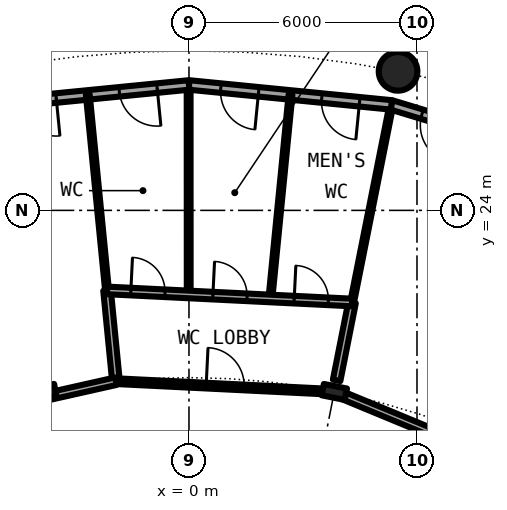
"""IFC4 building model, lengths in metres.
Left out: names, types, materials, properties, quantities, classifications, styles, units other than length and angle.
Written with IfcOpenShell. Run it as: python <this file> out.ifc"""

import sys

from ifc_helpers import new_model, si_unit, direction, frame, frame_2d, origin, origin_2d, place, context, subcontext, project, spatial, rectangle, hollow_circle, i_section, extrude, element, fill, save


model = new_model("IFC4")
c1 = context("Model", 3, precision=1e-05, world=origin(), true_north=direction((0.0, 1.0)))
c2 = subcontext(c1, "Body", "Model", "MODEL_VIEW")
j1 = project(units=[si_unit("LENGTHUNIT", "METRE"), si_unit("PLANEANGLEUNIT", "RADIAN")], contexts=[c1])
p1 = place(None, origin())
s1 = spatial("IfcSite", under=j1, at=p1, CompositionType="ELEMENT")
p2 = place(p1, origin())
s2 = spatial("IfcBuilding", under=s1, at=p2, CompositionType="ELEMENT")
p3 = place(p2, frame((0.0, 0.0, 53.3)))
s3 = spatial("IfcBuildingStorey", under=s2, at=p3, CompositionType="ELEMENT", Elevation=53.3)
p4 = place(p3, frame((5.501, 27.658, 0.0), z_axis=(0.0, 0.0, 1.0), x_axis=(1.0, 0.0, 0.0)))
e1 = element("IfcColumn", 1, at=p4, inside=s3, PredefinedType="COLUMN", context=c2, shape_type="SweptSolid", body=[
    extrude(hollow_circle(Radius=0.508, WallThickness=0.05, at=origin_2d()), origin(), (0.0, 0.0, 1.0), 4.2),
])
for number, where, z_axis, x_axis in (
    (2, (3.824, 19.223, 0.0), (0.0, 0.0, 1.0), (0.195, 0.981, 0.0)),
    (3, (-3.824, 19.223, 0.0), (0.0, 0.0, 1.0), (-0.195, 0.981, 0.0)),
):
    element("IfcColumn", number, at=place(p3, frame(where, z_axis=z_axis, x_axis=x_axis)), inside=s3, PredefinedType="COLUMN", context=c2, shape_type="SweptSolid", body=[
        extrude(i_section(OverallWidth=0.305, OverallDepth=0.62, WebThickness=0.021, FlangeThickness=0.04, FilletRadius=0.027, at=origin_2d()), origin(), (0.0, 0.0, 1.0), 4.2),
    ])
p5 = place(p3, frame((10.447, 25.222, 0.0), z_axis=(0.0, 0.0, 1.0), x_axis=(-0.956965678721, 0.290201119486, 0.0)))
e4 = element("IfcWall", 4, at=p5, inside=s3, PredefinedType="SOLIDWALL", context=c2, shape_type="SweptSolid", body=[
    extrude(rectangle(XDim=5.351, YDim=0.25, at=frame_2d((2.676, 0.0))), origin(), (0.0, 0.0, 1.0), 3.8),
])
p6 = place(p5, frame((0.841, 0.0, 0.0)))
e5 = element("IfcOpeningElement", 5, at=p6, cuts=e4, PredefinedType="OPENING", context=c2, shape_type="SweptSolid", body=[
    extrude(rectangle(XDim=1.0, YDim=2.2, at=frame_2d((0.5, 1.1))), frame((0.0, 0.135, 0.0), z_axis=(0.0, -1.0, 0.0), x_axis=(1.0, 0.0, 0.0)), (0.0, 0.0, 1.0), 0.27),
])
p7 = place(p5, frame((3.51, 0.0, 0.0)))
e6 = element("IfcOpeningElement", 6, at=p7, cuts=e4, PredefinedType="OPENING", context=c2, shape_type="SweptSolid", body=[
    extrude(rectangle(XDim=1.0, YDim=2.2, at=frame_2d((0.5, 1.1))), frame((0.0, 0.135, 0.0), z_axis=(0.0, -1.0, 0.0), x_axis=(1.0, 0.0, 0.0)), (0.0, 0.0, 1.0), 0.27),
])
p8 = place(p3, frame((5.326, 26.775, 0.0), z_axis=(0.0, 0.0, 1.0), x_axis=(-0.995173996315, 0.098126026407, 0.0)))
e7 = element("IfcWall", 7, at=p8, inside=s3, PredefinedType="SOLIDWALL", context=c2, shape_type="SweptSolid", body=[
    extrude(rectangle(XDim=5.352, YDim=0.25, at=frame_2d((2.676, 0.0))), origin(), (0.0, 0.0, 1.0), 3.8),
])
p9 = place(p8, frame((0.841, 0.0, 0.0)))
e8 = element("IfcOpeningElement", 8, at=p9, cuts=e7, PredefinedType="OPENING", context=c2, shape_type="SweptSolid", body=[
    extrude(rectangle(XDim=1.0, YDim=2.2, at=frame_2d((0.5, 1.1))), frame((0.0, 0.135, 0.0), z_axis=(0.0, -1.0, 0.0), x_axis=(1.0, 0.0, 0.0)), (0.0, 0.0, 1.0), 0.27),
])
p10 = place(p8, frame((3.51, 0.0, 0.0)))
e9 = element("IfcOpeningElement", 9, at=p10, cuts=e7, PredefinedType="OPENING", context=c2, shape_type="SweptSolid", body=[
    extrude(rectangle(XDim=1.0, YDim=2.2, at=frame_2d((0.5, 1.1))), frame((0.0, 0.135, 0.0), z_axis=(0.0, -1.0, 0.0), x_axis=(1.0, 0.0, 0.0)), (0.0, 0.0, 1.0), 0.27),
])
p11 = place(p3, frame((0.0, 27.3, 0.0), z_axis=(0.0, 0.0, 1.0), x_axis=(-0.995173996315, -0.098126026407, 0.0)))
e10 = element("IfcWall", 10, at=p11, inside=s3, PredefinedType="SOLIDWALL", context=c2, shape_type="SweptSolid", body=[
    extrude(rectangle(XDim=5.352, YDim=0.25, at=frame_2d((2.676, 0.0))), origin(), (0.0, 0.0, 1.0), 3.8),
])
p12 = place(p11, frame((0.841, 0.0, 0.0)))
e11 = element("IfcOpeningElement", 11, at=p12, cuts=e10, PredefinedType="OPENING", context=c2, shape_type="SweptSolid", body=[
    extrude(rectangle(XDim=1.0, YDim=2.2, at=frame_2d((0.5, 1.1))), frame((0.0, 0.135, 0.0), z_axis=(0.0, -1.0, 0.0), x_axis=(1.0, 0.0, 0.0)), (0.0, 0.0, 1.0), 0.27),
])
p13 = place(p11, frame((3.51, 0.0, 0.0)))
e12 = element("IfcOpeningElement", 12, at=p13, cuts=e10, PredefinedType="OPENING", context=c2, shape_type="SweptSolid", body=[
    extrude(rectangle(XDim=1.0, YDim=2.2, at=frame_2d((0.5, 1.1))), frame((0.0, 0.135, 0.0), z_axis=(0.0, -1.0, 0.0), x_axis=(1.0, 0.0, 0.0)), (0.0, 0.0, 1.0), 0.27),
])
p14 = place(p3, frame((-2.663, 27.044, 0.0), z_axis=(0.0, 0.0, 1.0), x_axis=(0.097990148768, -0.995187384739, 0.0)))
e13 = element("IfcWall", 13, at=p14, inside=s3, PredefinedType="PARTITIONING", context=c2, shape_type="SweptSolid", body=[
    extrude(rectangle(XDim=5.175, YDim=0.1, at=frame_2d((2.587, 0.0))), origin(), (0.0, 0.0, 1.0), 3.8),
])
p15 = place(p3, frame((-2.156, 21.894, 0.0), z_axis=(0.0, 0.0, 1.0), x_axis=(0.097982433599, -0.995188144376, 0.0)))
e14 = element("IfcWall", 14, at=p15, inside=s3, PredefinedType="PARTITIONING", context=c2, shape_type="SweptSolid", body=[
    extrude(rectangle(XDim=2.399, YDim=0.2, at=frame_2d((1.2, 0.0))), origin(), (0.0, 0.0, 1.0), 3.8),
])
p16 = place(p3, frame((-0.007, 21.788, 0.0), z_axis=(0.0, 0.0, 1.0), x_axis=(-0.000362565125, 0.999999934273, 0.0)))
e15 = element("IfcWall", 15, at=p16, inside=s3, PredefinedType="PARTITIONING", context=c2, shape_type="SweptSolid", body=[
    extrude(rectangle(XDim=5.387, YDim=0.1, at=frame_2d((2.693, 0.0))), origin(), (0.0, 0.0, 1.0), 3.8),
])
p17 = place(p3, frame((2.143, 21.683, 0.0), z_axis=(0.0, 0.0, 1.0), x_axis=(0.098229025711, 0.995163835008, 0.0)))
e16 = element("IfcWall", 16, at=p17, inside=s3, PredefinedType="PARTITIONING", context=c2, shape_type="SweptSolid", body=[
    extrude(rectangle(XDim=5.386, YDim=0.1, at=frame_2d((2.693, 0.0))), origin(), (0.0, 0.0, 1.0), 3.8),
])
p18 = place(p3, frame((3.885, 19.527, 0.0), z_axis=(0.0, 0.0, 1.0), x_axis=(0.194745508922, 0.980853804986, 0.0)))
e17 = element("IfcWall", 17, at=p18, inside=s3, PredefinedType="PARTITIONING", context=c2, shape_type="SweptSolid", body=[
    extrude(rectangle(XDim=2.09, YDim=0.2, at=frame_2d((1.045, 0.0))), origin(), (0.0, 0.0, 1.0), 3.8),
])
p19 = place(p3, frame((4.292, 21.577, 0.0), z_axis=(0.0, 0.0, 1.0), x_axis=(0.19514541008, 0.980774321098, 0.0)))
e18 = element("IfcWall", 18, at=p19, inside=s3, PredefinedType="PARTITIONING", context=c2, shape_type="SweptSolid", body=[
    extrude(rectangle(XDim=5.176, YDim=0.1, at=frame_2d((2.588, 0.0))), origin(), (0.0, 0.0, 1.0), 3.8),
])
p20 = place(p3, frame((3.967, 19.164, 0.0), z_axis=(0.0, 0.0, 1.0), x_axis=(0.923873274019, -0.382698541353, 0.0)))
e19 = element("IfcWall", 19, at=p20, inside=s3, PredefinedType="PARTITIONING", context=c2, shape_type="SweptSolid", body=[
    extrude(rectangle(XDim=7.338, YDim=0.2, at=frame_2d((3.669, 0.0))), origin(), (0.0, 0.0, 1.0), 3.48),
])
p21 = place(p3, frame((-1.921, 19.506, 0.0), z_axis=(0.0, 0.0, 1.0), x_axis=(0.99879118777, -0.049154483346, 0.0)))
e20 = element("IfcWall", 20, at=p21, inside=s3, PredefinedType="PARTITIONING", context=c2, shape_type="SweptSolid", body=[
    extrude(rectangle(XDim=5.598, YDim=0.15, at=frame_2d((2.799, 0.0))), origin(), (0.0, 0.0, 1.0), 3.48),
])
p22 = place(p21, frame((2.376, 0.0, 0.0)))
e21 = element("IfcOpeningElement", 21, at=p22, cuts=e20, PredefinedType="OPENING", context=c2, shape_type="SweptSolid", body=[
    extrude(rectangle(XDim=1.0, YDim=2.3, at=frame_2d((0.5, 1.15))), frame((0.0, 0.085, 0.0), z_axis=(0.0, -1.0, 0.0), x_axis=(1.0, 0.0, 0.0)), (0.0, 0.0, 1.0), 0.17),
])
p23 = place(p3, frame((-3.647, 19.118, 0.0), z_axis=(0.0, 0.0, 1.0), x_axis=(0.975631915864, 0.219413684049, 0.0)))
e22 = element("IfcWall", 22, at=p23, inside=s3, PredefinedType="PARTITIONING", context=c2, shape_type="SweptSolid", body=[
    extrude(rectangle(XDim=1.769, YDim=0.2, at=frame_2d((0.885, 0.0))), origin(), (0.0, 0.0, 1.0), 3.48),
])
p24 = place(p3, frame((-2.156, 21.894, 0.0), z_axis=(0.0, 0.0, 1.0), x_axis=(0.998785221138, -0.049275572418, 0.0)))
e23 = element("IfcWall", 23, at=p24, inside=s3, PredefinedType="PARTITIONING", context=c2, shape_type="SweptSolid", body=[
    extrude(rectangle(XDim=6.456, YDim=0.2, at=frame_2d((3.228, 0.0))), origin(), (0.0, 0.0, 1.0), 3.8),
])
p25 = place(p24, frame((4.93, 0.0, 0.0)))
e24 = element("IfcOpeningElement", 24, at=p25, cuts=e23, PredefinedType="OPENING", context=c2, shape_type="SweptSolid", body=[
    extrude(rectangle(XDim=0.9, YDim=2.3, at=frame_2d((0.45, 1.15))), frame((0.0, 0.11, 0.0), z_axis=(0.0, -1.0, 0.0), x_axis=(1.0, 0.0, 0.0)), (0.0, 0.0, 1.0), 0.22),
])
p26 = place(p24, frame((2.788, 0.0, 0.0)))
e25 = element("IfcOpeningElement", 25, at=p26, cuts=e23, PredefinedType="OPENING", context=c2, shape_type="SweptSolid", body=[
    extrude(rectangle(XDim=0.9, YDim=2.3, at=frame_2d((0.45, 1.15))), frame((0.0, 0.11, 0.0), z_axis=(0.0, -1.0, 0.0), x_axis=(1.0, 0.0, 0.0)), (0.0, 0.0, 1.0), 0.22),
])
p27 = place(p24, frame((0.626, 0.0, 0.0)))
e26 = element("IfcOpeningElement", 26, at=p27, cuts=e23, PredefinedType="OPENING", context=c2, shape_type="SweptSolid", body=[
    extrude(rectangle(XDim=0.9, YDim=2.3, at=frame_2d((0.45, 1.15))), frame((0.0, 0.11, 0.0), z_axis=(0.0, -1.0, 0.0), x_axis=(1.0, 0.0, 0.0)), (0.0, 0.0, 1.0), 0.22),
])
p28 = place(p7, origin())
e27 = element("IfcDoor", 27, at=p28, inside=s3, OperationType="SINGLE_SWING_LEFT", PredefinedType="DOOR", context=c2, shape_type="SweptSolid", body=[
    extrude(rectangle(XDim=1.0, YDim=2.2, at=frame_2d((0.5, 1.1))), frame((0.0, 0.025, 0.0), z_axis=(0.0, -1.0, 0.0), x_axis=(1.0, 0.0, 0.0)), (0.0, 0.0, 1.0), 0.05),
])
fill(e6, e27)
p29 = place(p9, origin())
e28 = element("IfcDoor", 28, at=p29, inside=s3, OperationType="SINGLE_SWING_LEFT", PredefinedType="DOOR", context=c2, shape_type="SweptSolid", body=[
    extrude(rectangle(XDim=1.0, YDim=2.2, at=frame_2d((0.5, 1.1))), frame((0.0, 0.025, 0.0), z_axis=(0.0, -1.0, 0.0), x_axis=(1.0, 0.0, 0.0)), (0.0, 0.0, 1.0), 0.05),
])
fill(e8, e28)
p30 = place(p10, origin())
e29 = element("IfcDoor", 29, at=p30, inside=s3, OperationType="SINGLE_SWING_LEFT", PredefinedType="DOOR", context=c2, shape_type="SweptSolid", body=[
    extrude(rectangle(XDim=1.0, YDim=2.2, at=frame_2d((0.5, 1.1))), frame((0.0, 0.025, 0.0), z_axis=(0.0, -1.0, 0.0), x_axis=(1.0, 0.0, 0.0)), (0.0, 0.0, 1.0), 0.05),
])
fill(e9, e29)
p31 = place(p12, origin())
e30 = element("IfcDoor", 30, at=p31, inside=s3, OperationType="SINGLE_SWING_LEFT", PredefinedType="DOOR", context=c2, shape_type="SweptSolid", body=[
    extrude(rectangle(XDim=1.0, YDim=2.2, at=frame_2d((0.5, 1.1))), frame((0.0, 0.025, 0.0), z_axis=(0.0, -1.0, 0.0), x_axis=(1.0, 0.0, 0.0)), (0.0, 0.0, 1.0), 0.05),
])
fill(e11, e30)
p32 = place(p13, origin())
e31 = element("IfcDoor", 31, at=p32, inside=s3, OperationType="SINGLE_SWING_LEFT", PredefinedType="DOOR", context=c2, shape_type="SweptSolid", body=[
    extrude(rectangle(XDim=1.0, YDim=2.2, at=frame_2d((0.5, 1.1))), frame((0.0, 0.025, 0.0), z_axis=(0.0, -1.0, 0.0), x_axis=(1.0, 0.0, 0.0)), (0.0, 0.0, 1.0), 0.05),
])
fill(e12, e31)
p33 = place(p22, origin())
e32 = element("IfcDoor", 32, at=p33, inside=s3, OperationType="SINGLE_SWING_RIGHT", PredefinedType="DOOR", context=c2, shape_type="SweptSolid", body=[
    extrude(rectangle(XDim=1.0, YDim=2.3, at=frame_2d((0.5, 1.15))), frame((0.0, 0.025, 0.0), z_axis=(0.0, -1.0, 0.0), x_axis=(1.0, 0.0, 0.0)), (0.0, 0.0, 1.0), 0.05),
])
fill(e21, e32)
p34 = place(p25, origin())
e33 = element("IfcDoor", 33, at=p34, inside=s3, OperationType="SINGLE_SWING_RIGHT", PredefinedType="DOOR", context=c2, shape_type="SweptSolid", body=[
    extrude(rectangle(XDim=0.9, YDim=2.3, at=frame_2d((0.45, 1.15))), frame((0.0, 0.025, 0.0), z_axis=(0.0, -1.0, 0.0), x_axis=(1.0, 0.0, 0.0)), (0.0, 0.0, 1.0), 0.05),
])
fill(e24, e33)
p35 = place(p26, origin())
e34 = element("IfcDoor", 34, at=p35, inside=s3, OperationType="SINGLE_SWING_RIGHT", PredefinedType="DOOR", context=c2, shape_type="SweptSolid", body=[
    extrude(rectangle(XDim=0.9, YDim=2.3, at=frame_2d((0.45, 1.15))), frame((0.0, 0.025, 0.0), z_axis=(0.0, -1.0, 0.0), x_axis=(1.0, 0.0, 0.0)), (0.0, 0.0, 1.0), 0.05),
])
fill(e25, e34)
p36 = place(p27, origin())
e35 = element("IfcDoor", 35, at=p36, inside=s3, OperationType="SINGLE_SWING_LEFT", PredefinedType="DOOR", context=c2, shape_type="SweptSolid", body=[
    extrude(rectangle(XDim=0.9, YDim=2.3, at=frame_2d((0.45, 1.15))), frame((0.0, 0.025, 0.0), z_axis=(0.0, -1.0, 0.0), x_axis=(1.0, 0.0, 0.0)), (0.0, 0.0, 1.0), 0.05),
])
fill(e26, e35)
save(model, sys.argv[1])
